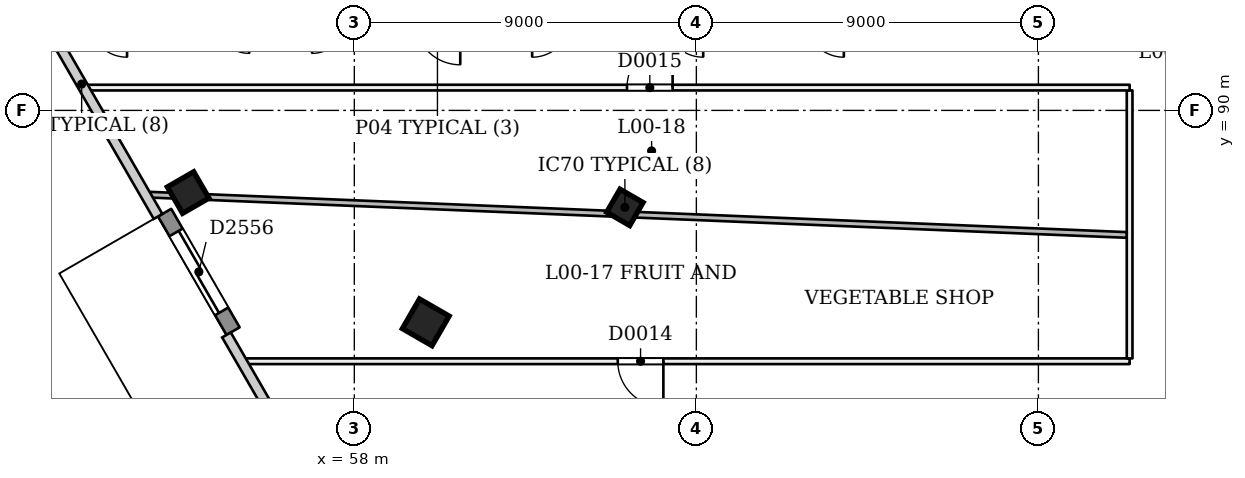
"""IFC4 building model, lengths in metres.
Left out: names, types, materials, properties, quantities, classifications, styles, units other than length and angle.
Written with IfcOpenShell. Run it as: python <this file> out.ifc"""

import sys

from ifc_helpers import new_model, si_unit, direction, frame, frame_2d, origin, origin_2d, place, context, subcontext, project, spatial, rectangle, extrude, element, fill, save


model = new_model("IFC4")
c1 = context("Model", 3, precision=1e-05, world=origin(), true_north=direction((0.0, 1.0)))
c2 = subcontext(c1, "Body", "Model", "MODEL_VIEW")
j1 = project(units=[si_unit("LENGTHUNIT", "METRE"), si_unit("PLANEANGLEUNIT", "RADIAN")], contexts=[c1])
p1 = place(None, origin())
s1 = spatial("IfcSite", under=j1, at=p1, CompositionType="ELEMENT")
p2 = place(p1, origin())
s2 = spatial("IfcBuilding", under=s1, at=p2, CompositionType="ELEMENT")
p3 = place(p2, origin())
s3 = spatial("IfcBuildingStorey", under=s2, at=p3, CompositionType="ELEMENT", Elevation=0.0)
p4 = place(p3, frame((65.092, 87.401, -0.021), z_axis=(0.022194887079, 0.038454877613, 0.999013818411), x_axis=(-0.865530914075, -0.499377310062, 0.038451774675)))
e1 = element("IfcColumn", 1, at=p4, inside=s3, PredefinedType="COLUMN", context=c2, shape_type="SweptSolid", body=[
    extrude(rectangle(XDim=0.7, YDim=0.7, at=origin_2d()), origin(), (0.0, 0.0, 1.0), 9.009),
])
p5 = place(p3, frame((59.853, 84.376, -0.027), z_axis=(0.022221973689, 0.038454854469, 0.999013217156), x_axis=(-0.865794426791, -0.498919402852, 0.038463489112)))
e2 = element("IfcColumn", 2, at=p5, inside=s3, PredefinedType="COLUMN", context=c2, shape_type="SweptSolid", body=[
    extrude(rectangle(XDim=0.9, YDim=0.9, at=origin_2d()), origin(), (0.0, 0.0, 1.0), 9.009),
])
p6 = place(p3, frame((53.628, 87.838, 0.0), z_axis=(0.0, 0.0, 1.0), x_axis=(0.866025412511, 0.499999984885, 0.0)))
e3 = element("IfcColumn", 3, at=p6, inside=s3, PredefinedType="COLUMN", context=c2, shape_type="SweptSolid", body=[
    extrude(rectangle(XDim=0.8, YDim=0.8, at=origin_2d()), origin(), (0.0, 0.0, 1.0), 9.0),
])
p7 = place(p3, frame((78.4, 83.4, 0.0), z_axis=(0.0, 0.0, 1.0), x_axis=(-1.0, 0.0, 0.0)))
e4 = element("IfcWall", 4, at=p7, inside=s3, PredefinedType="PARTITIONING", context=c2, shape_type="SweptSolid", body=[
    extrude(rectangle(XDim=23.287, YDim=0.15, at=frame_2d((11.644, 0.0))), origin(), (0.0, 0.0, 1.0), 8.55),
])
p8 = place(p7, frame((12.268, 0.0, 0.0)))
e5 = element("IfcOpeningElement", 5, at=p8, cuts=e4, PredefinedType="OPENING", context=c2, shape_type="SweptSolid", body=[
    extrude(rectangle(XDim=1.2, YDim=2.1, at=frame_2d((0.6, 1.05))), frame((0.0, 0.085, 0.0), z_axis=(0.0, -1.0, 0.0), x_axis=(1.0, 0.0, 0.0)), (0.0, 0.0, 1.0), 0.171),
])
p9 = place(p3, frame((78.4, 90.525, 0.0), z_axis=(0.0, 0.0, 1.0), x_axis=(0.0, -1.0, 0.0)))
e6 = element("IfcWall", 6, at=p9, inside=s3, PredefinedType="PARTITIONING", context=c2, shape_type="SweptSolid", body=[
    extrude(rectangle(XDim=7.05, YDim=0.15, at=frame_2d((3.525, 0.0))), origin(), (0.0, 0.0, 1.0), 8.55),
])
p10 = place(p3, frame((50.956, 90.6, 0.0), z_axis=(0.0, 0.0, 1.0), x_axis=(1.0, 0.0, 0.0)))
e7 = element("IfcWall", 7, at=p10, inside=s3, PredefinedType="PARTITIONING", context=c2, shape_type="SweptSolid", body=[
    extrude(rectangle(XDim=27.444, YDim=0.15, at=frame_2d((13.722, 0.0))), origin(), (0.0, 0.0, 1.0), 8.55),
])
p11 = place(p10, frame((14.219, 0.0, 0.0)))
e8 = element("IfcOpeningElement", 8, at=p11, cuts=e7, PredefinedType="OPENING", context=c2, shape_type="SweptSolid", body=[
    extrude(rectangle(XDim=1.2, YDim=2.1, at=frame_2d((0.6, 1.05))), frame((0.0, 0.085, 0.0), z_axis=(0.0, -1.0, 0.0), x_axis=(1.0, 0.0, 0.0)), (0.0, 0.0, 1.0), 0.171),
])
p12 = place(p3, frame((78.322, 86.723, 0.0), z_axis=(0.0, 0.0, 1.0), x_axis=(-0.999152360677, 0.041165035564, 0.0)))
e9 = element("IfcWall", 9, at=p12, inside=s3, PredefinedType="PARTITIONING", context=c2, shape_type="SweptSolid", body=[
    extrude(rectangle(XDim=25.763, YDim=0.15, at=frame_2d((12.882, 0.0))), origin(), (0.0, 0.0, 1.0), 8.55),
])
p13 = place(p3, frame((54.809, 84.192, 0.0), z_axis=(0.0, 0.0, 1.0), x_axis=(-0.500012057535, 0.866018442252, 0.0)))
e10 = element("IfcWall", 10, at=p13, inside=s3, PredefinedType="SOLIDWALL", context=c2, shape_type="SweptSolid", body=[
    extrude(rectangle(XDim=3.6, YDim=0.4, at=frame_2d((1.8, 0.0))), origin(), (0.0, 0.0, 1.0), 8.55),
])
p14 = place(p13, frame((0.6, 0.0, 0.0)))
e11 = element("IfcOpeningElement", 11, at=p14, cuts=e10, PredefinedType="OPENING", context=c2, shape_type="SweptSolid", body=[
    extrude(rectangle(XDim=2.4, YDim=2.4, at=frame_2d((1.2, 1.2))), frame((0.0, 0.21, 0.0), z_axis=(0.0, -1.0, 0.0), x_axis=(1.0, 0.0, 0.0)), (0.0, 0.0, 1.0), 0.421),
])
p15 = place(p8, origin())
e12 = element("IfcDoor", 12, at=p15, inside=s3, OperationType="SINGLE_SWING_LEFT", PredefinedType="NOTDEFINED", context=c2, shape_type="SweptSolid", body=[
    extrude(rectangle(XDim=1.2, YDim=2.1, at=frame_2d((0.6, 1.05))), frame((0.0, 0.025, 0.0), z_axis=(0.0, -1.0, 0.0), x_axis=(1.0, 0.0, 0.0)), (0.0, 0.0, 1.0), 0.05),
])
fill(e5, e12)
p16 = place(p11, origin())
e13 = element("IfcDoor", 13, at=p16, inside=s3, OperationType="SINGLE_SWING_RIGHT", PredefinedType="NOTDEFINED", context=c2, shape_type="SweptSolid", body=[
    extrude(rectangle(XDim=1.2, YDim=2.1, at=frame_2d((0.6, 1.05))), frame((0.0, 0.025, 0.0), z_axis=(0.0, -1.0, 0.0), x_axis=(1.0, 0.0, 0.0)), (0.0, 0.0, 1.0), 0.05),
])
fill(e8, e13)
p17 = place(p14, origin())
e14 = element("IfcDoor", 14, at=p17, inside=s3, OperationType="SLIDING_TO_LEFT", PredefinedType="NOTDEFINED", context=c2, shape_type="SweptSolid", body=[
    extrude(rectangle(XDim=2.4, YDim=2.4, at=frame_2d((1.2, 1.2))), frame((0.0, 0.025, 0.0), z_axis=(0.0, -1.0, 0.0), x_axis=(1.0, 0.0, 0.0)), (0.0, 0.0, 1.0), 0.05),
])
fill(e11, e14)
save(model, sys.argv[1])
